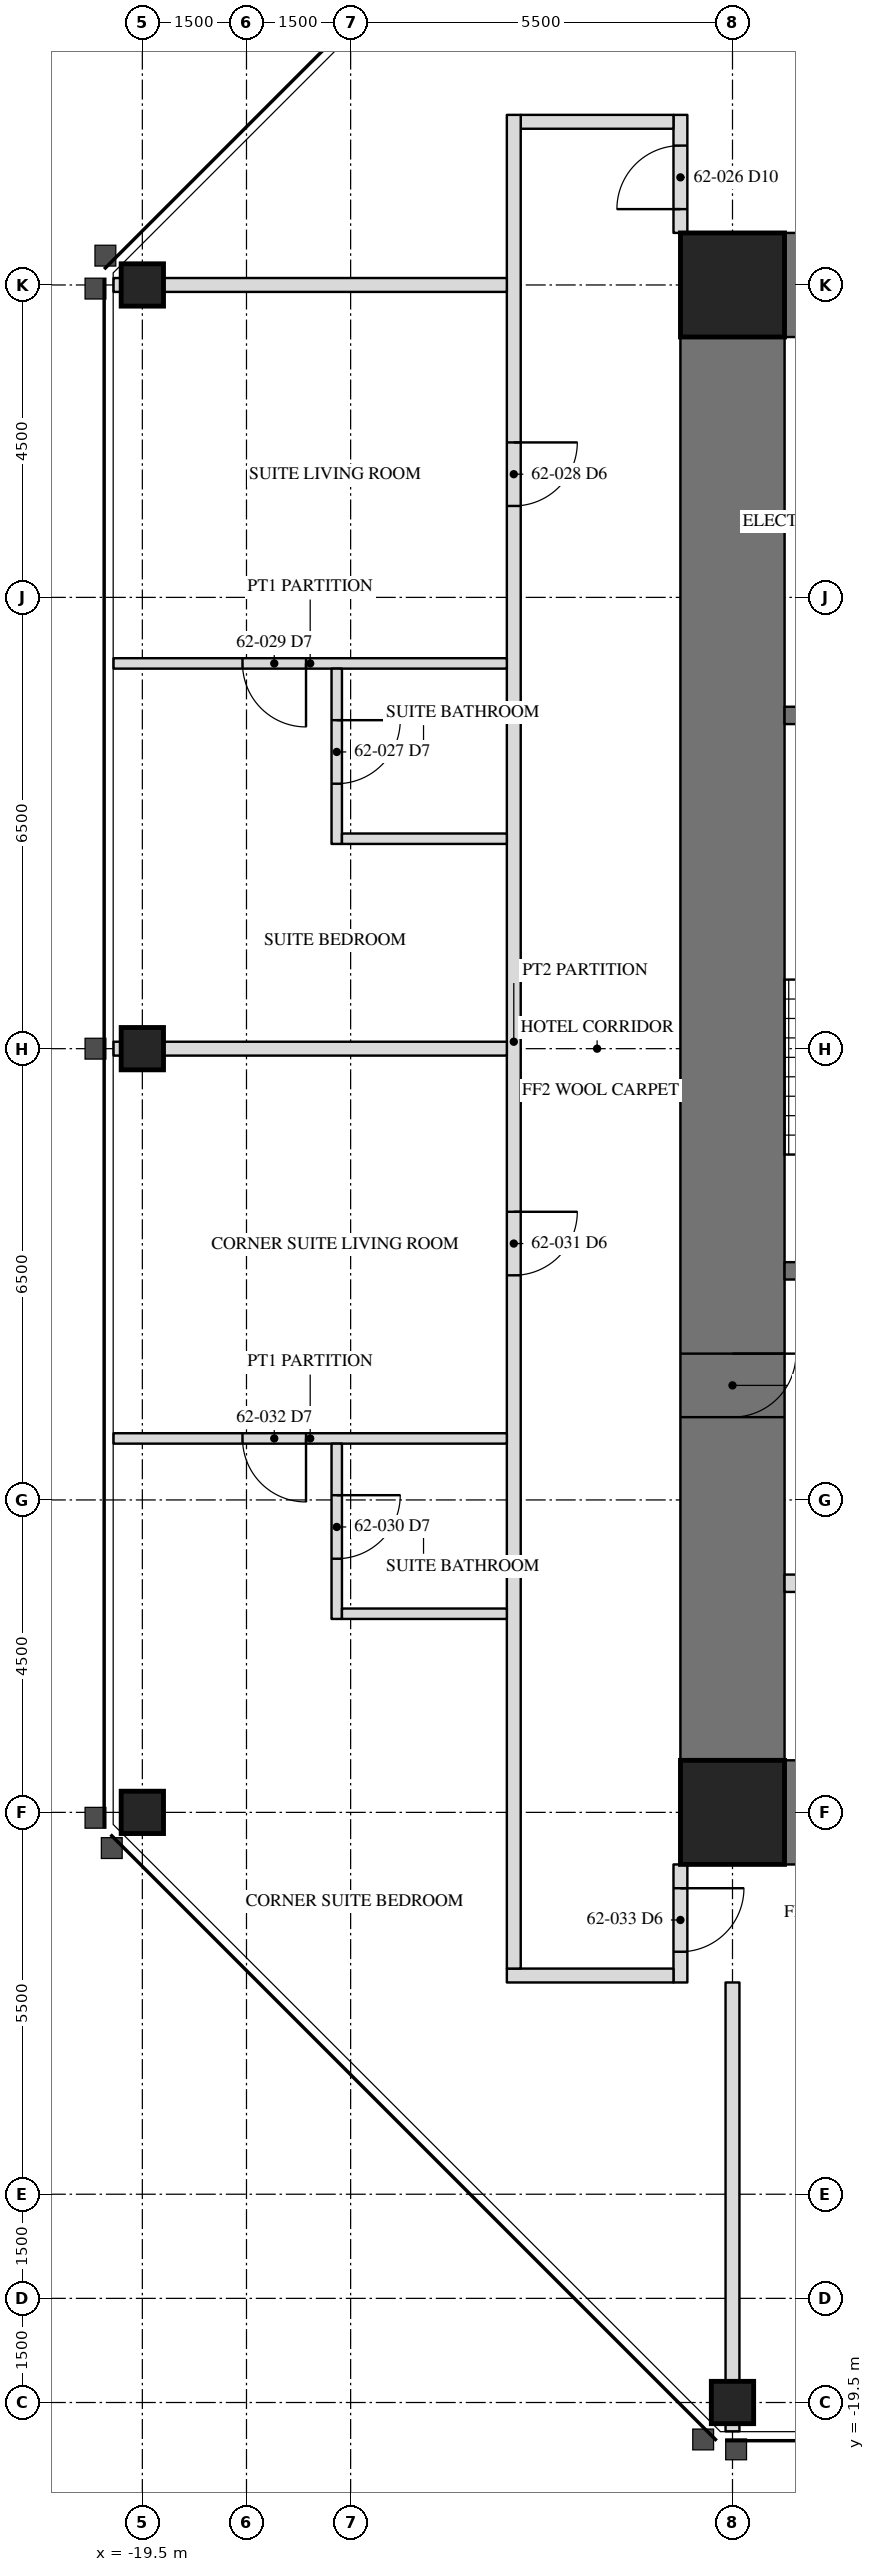
"""IFC4 building model, lengths in metres.
Left out: names, types, materials, properties, quantities, classifications, styles, units other than length and angle.
Written with IfcOpenShell. Run it as: python <this file> out.ifc"""

import sys

from ifc_helpers import new_model, si_unit, direction, frame, frame_2d, origin, origin_2d, place, context, subcontext, project, spatial, rectangle, hollow_rectangle, extrude, element, fill, save


model = new_model("IFC4")
c1 = context("Model", 3, precision=1e-05, world=origin(), true_north=direction((0.0, 1.0)))
c2 = subcontext(c1, "Body", "Model", "MODEL_VIEW")
j1 = project(units=[si_unit("LENGTHUNIT", "METRE"), si_unit("PLANEANGLEUNIT", "RADIAN")], contexts=[c1])
p1 = place(None, origin())
s1 = spatial("IfcSite", under=j1, at=p1, CompositionType="ELEMENT")
p2 = place(p1, origin())
s2 = spatial("IfcBuilding", under=s1, at=p2, CompositionType="ELEMENT")
p3 = place(p2, frame((0.0, 0.0, 253.7)))
s3 = spatial("IfcBuildingStorey", under=s2, at=p3, CompositionType="ELEMENT", Elevation=253.7)
for number, where, z_axis, x_axis in (
    (1, (-19.5, 0.0, 0.0), (0.0, 0.0, 1.0), (0.0, 1.0, 0.0)),
    (2, (-19.5, -11.0, 0.0), (0.0, 0.0, 1.0), (0.0, 1.0, 0.0)),
    (3, (-11.0, -19.5, 0.0), (0.0, 0.0, 1.0), (1.0, 0.0, 0.0)),
    (4, (-19.5, 11.0, 0.0), (0.0, 0.0, 1.0), (0.0, 1.0, 0.0)),
):
    element("IfcColumn", number, at=place(p3, frame(where, z_axis=z_axis, x_axis=x_axis)), inside=s3, PredefinedType="COLUMN", context=c2, shape_type="SweptSolid", body=[
        extrude(hollow_rectangle(XDim=0.61, YDim=0.61, WallThickness=0.051, at=origin_2d()), origin(), (0.0, 0.0, 1.0), 3.5),
    ])
p4 = place(p3, frame((-11.0, 11.0, 0.0), z_axis=(0.0, 0.0, 1.0), x_axis=(0.0, -1.0, 0.0)))
e5 = element("IfcWall", 5, at=p4, inside=s3, PredefinedType="SHEAR", context=c2, shape_type="SweptSolid", body=[
    extrude(rectangle(XDim=22.0, YDim=1.5, at=frame_2d((11.0, 0.0))), origin(), (0.0, 0.0, 1.0), 3.5),
])
p5 = place(p4, frame((15.393, 0.0, 0.0)))
e6 = element("IfcOpeningElement", 6, at=p5, cuts=e5, PredefinedType="OPENING", context=c2, shape_type="SweptSolid", body=[
    extrude(rectangle(XDim=0.915, YDim=2.134, at=frame_2d((0.458, 1.067))), frame((0.0, 0.76, 0.0), z_axis=(0.0, -1.0, 0.0), x_axis=(1.0, 0.0, 0.0)), (0.0, 0.0, 1.0), 1.52),
])
for number, where, z_axis, x_axis in (
    (7, (-6.5, 11.0, 0.0), (0.0, 0.0, 1.0), (-1.0, 0.0, 0.0)),
    (8, (-11.0, -11.0, 0.0), (0.0, 0.0, 1.0), (1.0, 0.0, 0.0)),
):
    element("IfcWall", number, at=place(p3, frame(where, z_axis=z_axis, x_axis=x_axis)), inside=s3, PredefinedType="SHEAR", context=c2, shape_type="SweptSolid", body=[
        extrude(rectangle(XDim=4.5, YDim=1.5, at=frame_2d((2.25, 0.0))), origin(), (0.0, 0.0, 1.0), 3.5),
    ])
for number, where, z_axis, x_axis in (
    (9, (-11.0, 11.0, 0.0), (0.0, 0.0, 1.0), (1.0, 0.0, 0.0)),
    (10, (-11.0, -11.0, 0.0), (0.0, 0.0, 1.0), (1.0, 0.0, 0.0)),
):
    element("IfcColumn", number, at=place(p3, frame(where, z_axis=z_axis, x_axis=x_axis)), inside=s3, PredefinedType="COLUMN", context=c2, shape_type="SweptSolid", body=[
        extrude(hollow_rectangle(XDim=1.499, YDim=1.499, WallThickness=0.102, at=origin_2d()), origin(), (0.0, 0.0, 1.0), 3.5),
    ])
p6 = place(p3, frame((-6.95, 4.8, 0.0), z_axis=(0.0, 0.0, 1.0), x_axis=(-1.0, 0.0, 0.0)))
e11 = element("IfcWall", 11, at=p6, inside=s3, PredefinedType="SOLIDWALL", context=c2, shape_type="SweptSolid", body=[
    extrude(rectangle(XDim=3.3, YDim=0.25, at=frame_2d((1.65, 0.0))), origin(), (0.0, 0.0, 1.0), 3.31),
])
p7 = place(p3, frame((-6.95, -3.2, 0.0), z_axis=(0.0, 0.0, 1.0), x_axis=(-1.0, 0.0, 0.0)))
e12 = element("IfcWall", 12, at=p7, inside=s3, PredefinedType="SOLIDWALL", context=c2, shape_type="SweptSolid", body=[
    extrude(rectangle(XDim=3.3, YDim=0.25, at=frame_2d((1.65, 0.0))), origin(), (0.0, 0.0, 1.0), 3.31),
])
p8 = place(p7, frame((1.116, 0.0, 0.0)))
e13 = element("IfcOpeningElement", 13, at=p8, cuts=e12, PredefinedType="OPENING", context=c2, shape_type="SweptSolid", body=[
    extrude(rectangle(XDim=1.067, YDim=2.134, at=frame_2d((0.533, 1.067))), frame((0.0, 0.135, 0.0), z_axis=(0.0, -1.0, 0.0), x_axis=(1.0, 0.0, 0.0)), (0.0, 0.0, 1.0), 0.27),
])
p9 = place(p3, frame((-6.95, -7.7, 0.0), z_axis=(0.0, 0.0, 1.0), x_axis=(-1.0, 0.0, 0.0)))
e14 = element("IfcWall", 14, at=p9, inside=s3, PredefinedType="PARTITIONING", context=c2, shape_type="SweptSolid", body=[
    extrude(rectangle(XDim=3.3, YDim=0.25, at=frame_2d((1.65, 0.0))), origin(), (0.0, 0.0, 1.0), 3.31),
])
p10 = place(p9, frame((0.45, 0.0, 0.0)))
e15 = element("IfcOpeningElement", 15, at=p10, cuts=e14, PredefinedType="OPENING", context=c2, shape_type="SweptSolid", body=[
    extrude(rectangle(XDim=1.219, YDim=2.134, at=frame_2d((0.609, 1.067))), frame((0.0, 0.135, 0.0), z_axis=(0.0, -1.0, 0.0), x_axis=(1.0, 0.0, 0.0)), (0.0, 0.0, 1.0), 0.27),
])
p11 = place(p3, frame((-11.75, 11.75, 0.0), z_axis=(0.0, 0.0, 1.0), x_axis=(0.0, 1.0, 0.0)))
e16 = element("IfcWall", 16, at=p11, inside=s3, PredefinedType="PARTITIONING", context=c2, shape_type="SweptSolid", body=[
    extrude(rectangle(XDim=1.7, YDim=0.2, at=frame_2d((0.85, 0.0))), origin(), (0.0, 0.0, 1.0), 3.31),
])
p12 = place(p11, frame((0.343, 0.0, 0.0)))
e17 = element("IfcOpeningElement", 17, at=p12, cuts=e16, PredefinedType="OPENING", context=c2, shape_type="SweptSolid", body=[
    extrude(rectangle(XDim=0.915, YDim=2.134, at=frame_2d((0.458, 1.067))), frame((0.0, 0.11, 0.0), z_axis=(0.0, -1.0, 0.0), x_axis=(1.0, 0.0, 0.0)), (0.0, 0.0, 1.0), 0.22),
])
p13 = place(p3, frame((-11.85, 13.35, 0.0), z_axis=(0.0, 0.0, 1.0), x_axis=(-1.0, 0.0, 0.0)))
e18 = element("IfcWall", 18, at=p13, inside=s3, PredefinedType="PARTITIONING", context=c2, shape_type="SweptSolid", body=[
    extrude(rectangle(XDim=2.2, YDim=0.2, at=frame_2d((1.1, 0.0))), origin(), (0.0, 0.0, 1.0), 3.31),
])
p14 = place(p3, frame((-11.75, -11.75, 0.0), z_axis=(0.0, 0.0, 1.0), x_axis=(0.0, -1.0, 0.0)))
e19 = element("IfcWall", 19, at=p14, inside=s3, PredefinedType="PARTITIONING", context=c2, shape_type="SweptSolid", body=[
    extrude(rectangle(XDim=1.7, YDim=0.2, at=frame_2d((0.85, 0.0))), origin(), (0.0, 0.0, 1.0), 3.31),
])
p15 = place(p14, frame((0.343, 0.0, 0.0)))
e20 = element("IfcOpeningElement", 20, at=p15, cuts=e19, PredefinedType="OPENING", context=c2, shape_type="SweptSolid", body=[
    extrude(rectangle(XDim=0.915, YDim=2.134, at=frame_2d((0.458, 1.067))), frame((0.0, 0.11, 0.0), z_axis=(0.0, -1.0, 0.0), x_axis=(1.0, 0.0, 0.0)), (0.0, 0.0, 1.0), 0.22),
])
p16 = place(p3, frame((-14.25, -13.35, 0.0), z_axis=(0.0, 0.0, 1.0), x_axis=(1.0, 0.0, 0.0)))
e21 = element("IfcWall", 21, at=p16, inside=s3, PredefinedType="PARTITIONING", context=c2, shape_type="SweptSolid", body=[
    extrude(rectangle(XDim=2.4, YDim=0.2, at=frame_2d((1.2, 0.0))), origin(), (0.0, 0.0, 1.0), 3.31),
])
p17 = place(p3, frame((-14.15, 13.45, 0.0), z_axis=(0.0, 0.0, 1.0), x_axis=(0.0, -1.0, 0.0)))
e22 = element("IfcWall", 22, at=p17, inside=s3, PredefinedType="PARTITIONING", context=c2, shape_type="SweptSolid", body=[
    extrude(rectangle(XDim=26.7, YDim=0.2, at=frame_2d((13.35, 0.0))), origin(), (0.0, 0.0, 1.0), 3.31),
])
p18 = place(p17, frame((4.718, 0.0, 0.0)))
e23 = element("IfcOpeningElement", 23, at=p18, cuts=e22, PredefinedType="OPENING", context=c2, shape_type="SweptSolid", body=[
    extrude(rectangle(XDim=0.915, YDim=2.134, at=frame_2d((0.458, 1.067))), frame((0.0, 0.11, 0.0), z_axis=(0.0, -1.0, 0.0), x_axis=(1.0, 0.0, 0.0)), (0.0, 0.0, 1.0), 0.22),
])
p19 = place(p17, frame((15.8, 0.0, 0.0)))
e24 = element("IfcOpeningElement", 24, at=p19, cuts=e22, PredefinedType="OPENING", context=c2, shape_type="SweptSolid", body=[
    extrude(rectangle(XDim=0.915, YDim=2.134, at=frame_2d((0.458, 1.067))), frame((0.0, 0.11, 0.0), z_axis=(0.0, -1.0, 0.0), x_axis=(1.0, 0.0, 0.0)), (0.0, 0.0, 1.0), 0.22),
])
for number, where, z_axis, x_axis in (
    (25, (-14.25, 11.0, 0.0), (0.0, 0.0, 1.0), (-1.0, 0.0, 0.0)),
    (26, (-14.25, 0.0, 0.0), (0.0, 0.0, 1.0), (-1.0, 0.0, 0.0)),
):
    element("IfcWall", number, at=place(p3, frame(where, z_axis=z_axis, x_axis=x_axis)), inside=s3, PredefinedType="PARTITIONING", context=c2, shape_type="SweptSolid", body=[
        extrude(rectangle(XDim=5.665, YDim=0.2, at=frame_2d((2.833, 0.0))), origin(), (0.0, 0.0, 1.0), 2.383),
    ])
p20 = place(p3, frame((-14.25, 5.549, 0.0), z_axis=(0.0, 0.0, 1.0), x_axis=(-1.0, 0.0, 0.0)))
e27 = element("IfcWall", 27, at=p20, inside=s3, PredefinedType="PARTITIONING", context=c2, shape_type="SweptSolid", body=[
    extrude(rectangle(XDim=5.665, YDim=0.15, at=frame_2d((2.833, 0.0))), origin(), (0.0, 0.0, 1.0), 3.31),
])
p21 = place(p20, frame((2.893, 0.0, 0.0)))
e28 = element("IfcOpeningElement", 28, at=p21, cuts=e27, PredefinedType="OPENING", context=c2, shape_type="SweptSolid", body=[
    extrude(rectangle(XDim=0.915, YDim=2.032, at=frame_2d((0.458, 1.016))), frame((0.0, 0.085, 0.0), z_axis=(0.0, -1.0, 0.0), x_axis=(1.0, 0.0, 0.0)), (0.0, 0.0, 1.0), 0.17),
])
p22 = place(p3, frame((-16.7, 5.474, 0.0), z_axis=(0.0, 0.0, 1.0), x_axis=(0.0, -1.0, 0.0)))
e29 = element("IfcWall", 29, at=p22, inside=s3, PredefinedType="PARTITIONING", context=c2, shape_type="SweptSolid", body=[
    extrude(rectangle(XDim=2.525, YDim=0.15, at=frame_2d((1.263, 0.0))), origin(), (0.0, 0.0, 1.0), 3.31),
])
p23 = place(p22, frame((0.742, 0.0, 0.0)))
e30 = element("IfcOpeningElement", 30, at=p23, cuts=e29, PredefinedType="OPENING", context=c2, shape_type="SweptSolid", body=[
    extrude(rectangle(XDim=0.915, YDim=2.032, at=frame_2d((0.458, 1.016))), frame((0.0, 0.085, 0.0), z_axis=(0.0, -1.0, 0.0), x_axis=(1.0, 0.0, 0.0)), (0.0, 0.0, 1.0), 0.17),
])
p24 = place(p3, frame((-14.25, 3.024, 0.0), z_axis=(0.0, 0.0, 1.0), x_axis=(-1.0, 0.0, 0.0)))
e31 = element("IfcWall", 31, at=p24, inside=s3, PredefinedType="PARTITIONING", context=c2, shape_type="SweptSolid", body=[
    extrude(rectangle(XDim=2.375, YDim=0.15, at=frame_2d((1.188, 0.0))), origin(), (0.0, 0.0, 1.0), 3.31),
])
p25 = place(p3, frame((-14.25, -5.614, 0.0), z_axis=(0.0, 0.0, 1.0), x_axis=(-1.0, 0.0, 0.0)))
e32 = element("IfcWall", 32, at=p25, inside=s3, PredefinedType="PARTITIONING", context=c2, shape_type="SweptSolid", body=[
    extrude(rectangle(XDim=5.665, YDim=0.15, at=frame_2d((2.833, 0.0))), origin(), (0.0, 0.0, 1.0), 3.31),
])
p26 = place(p25, frame((2.893, 0.0, 0.0)))
e33 = element("IfcOpeningElement", 33, at=p26, cuts=e32, PredefinedType="OPENING", context=c2, shape_type="SweptSolid", body=[
    extrude(rectangle(XDim=0.915, YDim=2.032, at=frame_2d((0.458, 1.016))), frame((0.0, 0.085, 0.0), z_axis=(0.0, -1.0, 0.0), x_axis=(1.0, 0.0, 0.0)), (0.0, 0.0, 1.0), 0.17),
])
p27 = place(p3, frame((-16.7, -5.689, 0.0), z_axis=(0.0, 0.0, 1.0), x_axis=(0.0, -1.0, 0.0)))
e34 = element("IfcWall", 34, at=p27, inside=s3, PredefinedType="PARTITIONING", context=c2, shape_type="SweptSolid", body=[
    extrude(rectangle(XDim=2.525, YDim=0.15, at=frame_2d((1.263, 0.0))), origin(), (0.0, 0.0, 1.0), 3.31),
])
p28 = place(p27, frame((0.742, 0.0, 0.0)))
e35 = element("IfcOpeningElement", 35, at=p28, cuts=e34, PredefinedType="OPENING", context=c2, shape_type="SweptSolid", body=[
    extrude(rectangle(XDim=0.915, YDim=2.032, at=frame_2d((0.458, 1.016))), frame((0.0, 0.085, 0.0), z_axis=(0.0, -1.0, 0.0), x_axis=(1.0, 0.0, 0.0)), (0.0, 0.0, 1.0), 0.17),
])
p29 = place(p3, frame((-14.25, -8.139, 0.0), z_axis=(0.0, 0.0, 1.0), x_axis=(-1.0, 0.0, 0.0)))
e36 = element("IfcWall", 36, at=p29, inside=s3, PredefinedType="PARTITIONING", context=c2, shape_type="SweptSolid", body=[
    extrude(rectangle(XDim=2.375, YDim=0.15, at=frame_2d((1.188, 0.0))), origin(), (0.0, 0.0, 1.0), 3.31),
])
p30 = place(p3, frame((-11.0, -13.45, 0.0), z_axis=(0.0, 0.0, 1.0), x_axis=(0.0, -1.0, 0.0)))
e37 = element("IfcWall", 37, at=p30, inside=s3, PredefinedType="PARTITIONING", context=c2, shape_type="SweptSolid", body=[
    extrude(rectangle(XDim=6.465, YDim=0.2, at=frame_2d((3.232, 0.0))), origin(), (0.0, 0.0, 1.0), 2.383),
])
p31 = place(p5, origin())
e38 = element("IfcDoor", 38, at=p31, inside=s3, OperationType="SINGLE_SWING_RIGHT", PredefinedType="DOOR", context=c2, shape_type="SweptSolid", body=[
    extrude(rectangle(XDim=0.915, YDim=2.134, at=frame_2d((0.458, 1.067))), frame((0.0, -0.675, 0.0), z_axis=(0.0, -1.0, 0.0), x_axis=(1.0, 0.0, 0.0)), (0.0, 0.0, 1.0), 0.05),
])
fill(e6, e38)
p32 = place(p12, origin())
e39 = element("IfcDoor", 39, at=p32, inside=s3, OperationType="SINGLE_SWING_LEFT", PredefinedType="DOOR", context=c2, shape_type="SweptSolid", body=[
    extrude(rectangle(XDim=0.915, YDim=2.134, at=frame_2d((0.458, 1.067))), frame((0.0, 0.025, 0.0), z_axis=(0.0, -1.0, 0.0), x_axis=(1.0, 0.0, 0.0)), (0.0, 0.0, 1.0), 0.05),
])
fill(e17, e39)
p33 = place(p23, origin())
e40 = element("IfcDoor", 40, at=p33, inside=s3, OperationType="SINGLE_SWING_LEFT", PredefinedType="DOOR", context=c2, shape_type="SweptSolid", body=[
    extrude(rectangle(XDim=0.915, YDim=2.032, at=frame_2d((0.458, 1.016))), frame((0.0, 0.025, 0.0), z_axis=(0.0, -1.0, 0.0), x_axis=(1.0, 0.0, 0.0)), (0.0, 0.0, 1.0), 0.05),
])
fill(e30, e40)
p34 = place(p18, origin())
e41 = element("IfcDoor", 41, at=p34, inside=s3, OperationType="SINGLE_SWING_LEFT", PredefinedType="DOOR", context=c2, shape_type="SweptSolid", body=[
    extrude(rectangle(XDim=0.915, YDim=2.134, at=frame_2d((0.458, 1.067))), frame((0.0, 0.025, 0.0), z_axis=(0.0, -1.0, 0.0), x_axis=(1.0, 0.0, 0.0)), (0.0, 0.0, 1.0), 0.05),
])
fill(e23, e41)
p35 = place(p21, origin())
e42 = element("IfcDoor", 42, at=p35, inside=s3, OperationType="SINGLE_SWING_LEFT", PredefinedType="DOOR", context=c2, shape_type="SweptSolid", body=[
    extrude(rectangle(XDim=0.915, YDim=2.032, at=frame_2d((0.458, 1.016))), frame((0.0, 0.025, 0.0), z_axis=(0.0, -1.0, 0.0), x_axis=(1.0, 0.0, 0.0)), (0.0, 0.0, 1.0), 0.05),
])
fill(e28, e42)
p36 = place(p28, origin())
e43 = element("IfcDoor", 43, at=p36, inside=s3, OperationType="SINGLE_SWING_LEFT", PredefinedType="DOOR", context=c2, shape_type="SweptSolid", body=[
    extrude(rectangle(XDim=0.915, YDim=2.032, at=frame_2d((0.458, 1.016))), frame((0.0, 0.025, 0.0), z_axis=(0.0, -1.0, 0.0), x_axis=(1.0, 0.0, 0.0)), (0.0, 0.0, 1.0), 0.05),
])
fill(e35, e43)
p37 = place(p19, origin())
e44 = element("IfcDoor", 44, at=p37, inside=s3, OperationType="SINGLE_SWING_LEFT", PredefinedType="DOOR", context=c2, shape_type="SweptSolid", body=[
    extrude(rectangle(XDim=0.915, YDim=2.134, at=frame_2d((0.458, 1.067))), frame((0.0, 0.025, 0.0), z_axis=(0.0, -1.0, 0.0), x_axis=(1.0, 0.0, 0.0)), (0.0, 0.0, 1.0), 0.05),
])
fill(e24, e44)
p38 = place(p26, origin())
e45 = element("IfcDoor", 45, at=p38, inside=s3, OperationType="SINGLE_SWING_LEFT", PredefinedType="DOOR", context=c2, shape_type="SweptSolid", body=[
    extrude(rectangle(XDim=0.915, YDim=2.032, at=frame_2d((0.458, 1.016))), frame((0.0, 0.025, 0.0), z_axis=(0.0, -1.0, 0.0), x_axis=(1.0, 0.0, 0.0)), (0.0, 0.0, 1.0), 0.05),
])
fill(e33, e45)
p39 = place(p15, origin())
e46 = element("IfcDoor", 46, at=p39, inside=s3, OperationType="SINGLE_SWING_LEFT", PredefinedType="DOOR", context=c2, shape_type="SweptSolid", body=[
    extrude(rectangle(XDim=0.915, YDim=2.134, at=frame_2d((0.458, 1.067))), frame((0.0, 0.025, 0.0), z_axis=(0.0, -1.0, 0.0), x_axis=(1.0, 0.0, 0.0)), (0.0, 0.0, 1.0), 0.05),
])
fill(e20, e46)
save(model, sys.argv[1])
